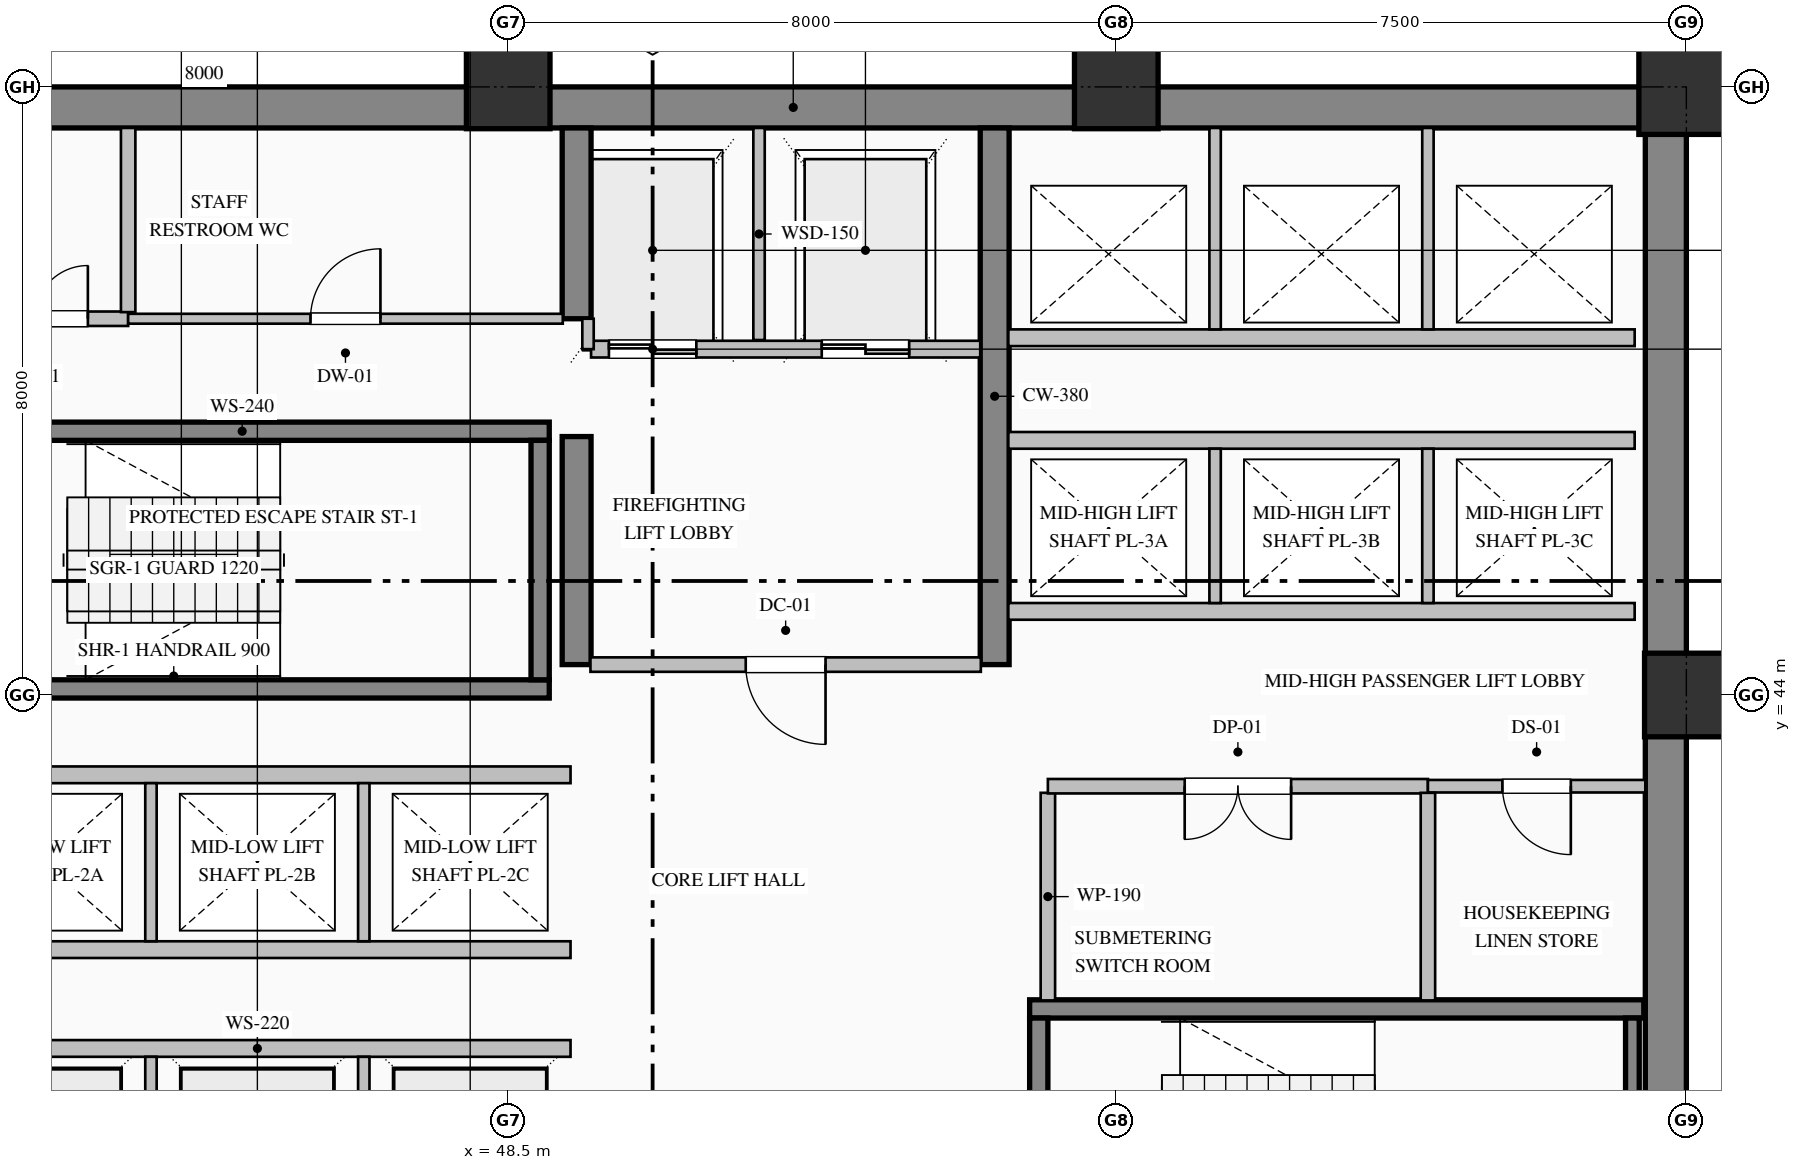
"""IFC4 building model, lengths in metres.
Left out: names, types, materials, properties, quantities, classifications, styles, units other than length and angle.
Written with IfcOpenShell. Run it as: python <this file> out.ifc"""

import sys

from ifc_helpers import new_model, si_unit, direction, frame, frame_2d, origin, origin_2d, place, context, subcontext, project, spatial, rectangle, hollow_rectangle, extrude, element, fill, save


model = new_model("IFC4")
c1 = context("Model", 3, precision=1e-05, world=origin(), true_north=direction((0.0, 1.0)))
c2 = subcontext(c1, "Body", "Model", "MODEL_VIEW")
j1 = project(units=[si_unit("LENGTHUNIT", "METRE"), si_unit("PLANEANGLEUNIT", "RADIAN")], contexts=[c1])
p1 = place(None, origin())
s1 = spatial("IfcSite", under=j1, at=p1, CompositionType="ELEMENT")
p2 = place(p1, origin())
s2 = spatial("IfcBuilding", under=s1, at=p2, CompositionType="ELEMENT")
p3 = place(p2, frame((0.0, 0.0, 96.2)))
s3 = spatial("IfcBuildingStorey", under=s2, at=p3, CompositionType="ELEMENT", Elevation=96.2)
p4 = place(p3, frame((40.5, 51.73, 0.0), z_axis=(0.0, 0.0, 1.0), x_axis=(1.0, 0.0, 0.0)))
e1 = element("IfcWall", 1, at=p4, inside=s3, PredefinedType="SHEAR", context=c2, shape_type="SweptSolid", body=[
    extrude(rectangle(XDim=23.5, YDim=0.54, at=frame_2d((11.75, 0.0))), origin(), (0.0, 0.0, 1.0), 3.75),
])
p5 = place(p3, frame((63.73, 36.32, 0.0), z_axis=(0.0, 0.0, 1.0), x_axis=(0.0, 1.0, 0.0)))
e2 = element("IfcWall", 2, at=p5, inside=s3, PredefinedType="SHEAR", context=c2, shape_type="SweptSolid", body=[
    extrude(rectangle(XDim=15.14, YDim=0.54, at=frame_2d((7.57, 0.0))), origin(), (0.0, 0.0, 1.0), 3.75),
])
p6 = place(p3, frame((49.4, 44.4, 0.0), z_axis=(0.0, 0.0, 1.0), x_axis=(0.0, 1.0, 0.0)))
e3 = element("IfcWall", 3, at=p6, inside=s3, PredefinedType="SHEAR", context=c2, shape_type="SweptSolid", body=[
    extrude(rectangle(XDim=3.0, YDim=0.38, at=frame_2d((1.5, 0.0))), origin(), (0.0, 0.0, 1.0), 3.75),
])
p7 = place(p3, frame((49.4, 48.95, 0.0), z_axis=(0.0, 0.0, 1.0), x_axis=(0.0, 1.0, 0.0)))
e4 = element("IfcWall", 4, at=p7, inside=s3, PredefinedType="SHEAR", context=c2, shape_type="SweptSolid", body=[
    extrude(rectangle(XDim=2.51, YDim=0.38, at=frame_2d((1.255, 0.0))), origin(), (0.0, 0.0, 1.0), 3.75),
])
p8 = place(p3, frame((54.9, 44.4, 0.0), z_axis=(0.0, 0.0, 1.0), x_axis=(0.0, 1.0, 0.0)))
e5 = element("IfcWall", 5, at=p8, inside=s3, PredefinedType="SHEAR", context=c2, shape_type="SweptSolid", body=[
    extrude(rectangle(XDim=7.06, YDim=0.38, at=frame_2d((3.53, 0.0))), origin(), (0.0, 0.0, 1.0), 3.75),
])
for number, where, z_axis, x_axis in (
    (6, (48.5, 52.0, 0.0), (0.0, 0.0, 1.0), (1.0, 0.0, 0.0)),
    (7, (56.5, 52.0, 0.0), (0.0, 0.0, 1.0), (1.0, 0.0, 0.0)),
    (8, (64.0, 44.0, 0.0), (0.0, 0.0, 1.0), (1.0, 0.0, 0.0)),
):
    element("IfcColumn", number, at=place(p3, frame(where, z_axis=z_axis, x_axis=x_axis)), inside=s3, PredefinedType="COLUMN", context=c2, shape_type="SweptSolid", body=[
        extrude(hollow_rectangle(XDim=1.1, YDim=1.1, WallThickness=0.04, at=origin_2d()), origin(), (0.0, 0.0, 1.0), 4.0),
    ])
p9 = place(p3, frame((64.0, 52.0, 0.0), z_axis=(0.0, 0.0, 1.0), x_axis=(1.0, 0.0, 0.0)))
e9 = element("IfcColumn", 9, at=p9, inside=s3, PredefinedType="COLUMN", context=c2, shape_type="SweptSolid", body=[
    extrude(hollow_rectangle(XDim=1.25, YDim=1.25, WallThickness=0.045, at=origin_2d()), origin(), (0.0, 0.0, 1.0), 4.0),
])
for number, where, z_axis, x_axis in (
    (10, (40.96, 47.47, 0.0), (0.0, 0.0, 1.0), (1.0, 0.0, 0.0)),
    (11, (49.04, 44.08, 0.0), (0.0, 0.0, 1.0), (-1.0, 0.0, 0.0)),
):
    element("IfcWall", number, at=place(p3, frame(where, z_axis=z_axis, x_axis=x_axis)), inside=s3, PredefinedType="SOLIDWALL", context=c2, shape_type="SweptSolid", body=[
        extrude(rectangle(XDim=8.08, YDim=0.24, at=frame_2d((4.04, 0.0))), origin(), (0.0, 0.0, 1.0), 4.0),
    ])
p10 = place(p3, frame((48.92, 44.2, 0.0), z_axis=(0.0, 0.0, 1.0), x_axis=(0.0, 1.0, 0.0)))
e12 = element("IfcWall", 12, at=p10, inside=s3, PredefinedType="SOLIDWALL", context=c2, shape_type="SweptSolid", body=[
    extrude(rectangle(XDim=3.15, YDim=0.24, at=frame_2d((1.575, 0.0))), origin(), (0.0, 0.0, 1.0), 4.0),
])
p11 = place(p3, frame((55.36, 39.87, 0.0), z_axis=(0.0, 0.0, 1.0), x_axis=(1.0, 0.0, 0.0)))
e13 = element("IfcWall", 13, at=p11, inside=s3, PredefinedType="SOLIDWALL", context=c2, shape_type="SweptSolid", body=[
    extrude(rectangle(XDim=8.08, YDim=0.24, at=frame_2d((4.04, 0.0))), origin(), (0.0, 0.0, 1.0), 4.0),
])
p12 = place(p3, frame((55.48, 39.75, 0.0), z_axis=(0.0, 0.0, 1.0), x_axis=(0.0, -1.0, 0.0)))
e14 = element("IfcWall", 14, at=p12, inside=s3, PredefinedType="SOLIDWALL", context=c2, shape_type="SweptSolid", body=[
    extrude(rectangle(XDim=3.15, YDim=0.24, at=frame_2d((1.575, 0.0))), origin(), (0.0, 0.0, 1.0), 4.0),
])
p13 = place(p12, frame((1.0, 0.0, 0.0)))
e15 = element("IfcOpeningElement", 15, at=p13, cuts=e14, PredefinedType="OPENING", context=c2, shape_type="SweptSolid", body=[
    extrude(rectangle(XDim=1.15, YDim=2.2, at=frame_2d((0.575, 1.1))), frame((0.0, 0.13, 0.0), z_axis=(0.0, -1.0, 0.0), x_axis=(1.0, 0.0, 0.0)), (0.0, 0.0, 1.0), 0.26),
])
p14 = place(p3, frame((63.29, 36.6, 0.0), z_axis=(0.0, 0.0, 1.0), x_axis=(0.0, 1.0, 0.0)))
e16 = element("IfcWall", 16, at=p14, inside=s3, PredefinedType="SOLIDWALL", context=c2, shape_type="SweptSolid", body=[
    extrude(rectangle(XDim=3.15, YDim=0.18, at=frame_2d((1.575, 0.0))), origin(), (0.0, 0.0, 1.0), 4.0),
])
p15 = place(p3, frame((54.71, 48.55, 0.0), z_axis=(0.0, 0.0, 1.0), x_axis=(-1.0, 0.0, 0.0)))
e17 = element("IfcWall", 17, at=p15, inside=s3, PredefinedType="PARTITIONING", context=c2, shape_type="SweptSolid", body=[
    extrude(rectangle(XDim=5.12, YDim=0.22, at=frame_2d((2.56, 0.0))), origin(), (0.0, 0.0, 1.0), 3.75),
])
p16 = place(p15, frame((3.735, 0.0, 0.0)))
e18 = element("IfcOpeningElement", 18, at=p16, cuts=e17, PredefinedType="OPENING", context=c2, shape_type="SweptSolid", body=[
    extrude(rectangle(XDim=1.15, YDim=2.2, at=frame_2d((0.575, 1.1))), frame((0.0, 0.12, 0.0), z_axis=(0.0, -1.0, 0.0), x_axis=(1.0, 0.0, 0.0)), (0.0, 0.0, 1.0), 0.24),
])
p17 = place(p15, frame((0.935, 0.0, 0.0)))
e19 = element("IfcOpeningElement", 19, at=p17, cuts=e17, PredefinedType="OPENING", context=c2, shape_type="SweptSolid", body=[
    extrude(rectangle(XDim=1.15, YDim=2.2, at=frame_2d((0.575, 1.1))), frame((0.0, 0.12, 0.0), z_axis=(0.0, -1.0, 0.0), x_axis=(1.0, 0.0, 0.0)), (0.0, 0.0, 1.0), 0.24),
])
p18 = place(p3, frame((51.8, 48.67, 0.0), z_axis=(0.0, 0.0, 1.0), x_axis=(0.0, 1.0, 0.0)))
e20 = element("IfcWall", 20, at=p18, inside=s3, PredefinedType="PARTITIONING", context=c2, shape_type="SweptSolid", body=[
    extrude(rectangle(XDim=2.79, YDim=0.15, at=frame_2d((1.395, 0.0))), origin(), (0.0, 0.0, 1.0), 3.75),
])
p19 = place(p3, frame((49.55, 48.55, 0.0), z_axis=(0.0, 0.0, 1.0), x_axis=(0.0, 1.0, 0.0)))
e21 = element("IfcWall", 21, at=p19, inside=s3, PredefinedType="PARTITIONING", context=c2, shape_type="SweptSolid", body=[
    extrude(rectangle(XDim=0.4, YDim=0.15, at=frame_2d((0.2, 0.0))), origin(), (0.0, 0.0, 1.0), 3.75),
])
p20 = place(p3, frame((41.08, 39.35, 0.0), z_axis=(0.0, 0.0, 1.0), x_axis=(1.0, 0.0, 0.0)))
e22 = element("IfcWall", 22, at=p20, inside=s3, PredefinedType="PARTITIONING", context=c2, shape_type="SweptSolid", body=[
    extrude(rectangle(XDim=8.24, YDim=0.22, at=frame_2d((4.12, 0.0))), origin(), (0.0, 0.0, 1.0), 3.75),
])
for number, where, z_axis, x_axis in (
    (23, (43.8, 37.16, 0.0), (0.0, 0.0, 1.0), (0.0, 1.0, 0.0)),
    (24, (46.6, 37.16, 0.0), (0.0, 0.0, 1.0), (0.0, 1.0, 0.0)),
):
    element("IfcWall", number, at=place(p3, frame(where, z_axis=z_axis, x_axis=x_axis)), inside=s3, PredefinedType="PARTITIONING", context=c2, shape_type="SweptSolid", body=[
        extrude(rectangle(XDim=2.08, YDim=0.15, at=frame_2d((1.04, 0.0))), origin(), (0.0, 0.0, 1.0), 3.75),
    ])
for number, where, z_axis, x_axis in (
    (25, (49.32, 40.65, 0.0), (0.0, 0.0, 1.0), (-1.0, 0.0, 0.0)),
    (26, (41.08, 42.95, 0.0), (0.0, 0.0, 1.0), (1.0, 0.0, 0.0)),
):
    element("IfcWall", number, at=place(p3, frame(where, z_axis=z_axis, x_axis=x_axis)), inside=s3, PredefinedType="PARTITIONING", context=c2, shape_type="SweptSolid", body=[
        extrude(rectangle(XDim=8.24, YDim=0.22, at=frame_2d((4.12, 0.0))), origin(), (0.0, 0.0, 1.0), 3.75),
    ])
for number, where, z_axis, x_axis in (
    (27, (43.8, 40.76, 0.0), (0.0, 0.0, 1.0), (0.0, 1.0, 0.0)),
    (28, (46.6, 40.76, 0.0), (0.0, 0.0, 1.0), (0.0, 1.0, 0.0)),
):
    element("IfcWall", number, at=place(p3, frame(where, z_axis=z_axis, x_axis=x_axis)), inside=s3, PredefinedType="PARTITIONING", context=c2, shape_type="SweptSolid", body=[
        extrude(rectangle(XDim=2.08, YDim=0.15, at=frame_2d((1.04, 0.0))), origin(), (0.0, 0.0, 1.0), 3.75),
    ])
for number, where, z_axis, x_axis in (
    (29, (63.32, 45.1, 0.0), (0.0, 0.0, 1.0), (-1.0, 0.0, 0.0)),
    (30, (55.08, 47.35, 0.0), (0.0, 0.0, 1.0), (1.0, 0.0, 0.0)),
):
    element("IfcWall", number, at=place(p3, frame(where, z_axis=z_axis, x_axis=x_axis)), inside=s3, PredefinedType="PARTITIONING", context=c2, shape_type="SweptSolid", body=[
        extrude(rectangle(XDim=8.24, YDim=0.22, at=frame_2d((4.12, 0.0))), origin(), (0.0, 0.0, 1.0), 3.75),
    ])
for number, where, z_axis, x_axis in (
    (31, (57.8, 45.21, 0.0), (0.0, 0.0, 1.0), (0.0, 1.0, 0.0)),
    (32, (60.6, 45.21, 0.0), (0.0, 0.0, 1.0), (0.0, 1.0, 0.0)),
):
    element("IfcWall", number, at=place(p3, frame(where, z_axis=z_axis, x_axis=x_axis)), inside=s3, PredefinedType="PARTITIONING", context=c2, shape_type="SweptSolid", body=[
        extrude(rectangle(XDim=2.03, YDim=0.15, at=frame_2d((1.015, 0.0))), origin(), (0.0, 0.0, 1.0), 3.75),
    ])
p21 = place(p3, frame((63.32, 48.7, 0.0), z_axis=(0.0, 0.0, 1.0), x_axis=(-1.0, 0.0, 0.0)))
e33 = element("IfcWall", 33, at=p21, inside=s3, PredefinedType="PARTITIONING", context=c2, shape_type="SweptSolid", body=[
    extrude(rectangle(XDim=8.24, YDim=0.22, at=frame_2d((4.12, 0.0))), origin(), (0.0, 0.0, 1.0), 3.75),
])
for number, where, z_axis, x_axis in (
    (34, (57.8, 48.81, 0.0), (0.0, 0.0, 1.0), (0.0, 1.0, 0.0)),
    (35, (60.6, 48.81, 0.0), (0.0, 0.0, 1.0), (0.0, 1.0, 0.0)),
):
    element("IfcWall", number, at=place(p3, frame(where, z_axis=z_axis, x_axis=x_axis)), inside=s3, PredefinedType="PARTITIONING", context=c2, shape_type="SweptSolid", body=[
        extrude(rectangle(XDim=2.65, YDim=0.15, at=frame_2d((1.325, 0.0))), origin(), (0.0, 0.0, 1.0), 3.75),
    ])
p22 = place(p3, frame((41.04, 48.95, 0.0), z_axis=(0.0, 0.0, 1.0), x_axis=(1.0, 0.0, 0.0)))
e36 = element("IfcWall", 36, at=p22, inside=s3, PredefinedType="PARTITIONING", context=c2, shape_type="SweptSolid", body=[
    extrude(rectangle(XDim=2.46, YDim=0.19, at=frame_2d((1.23, 0.0))), origin(), (0.0, 0.0, 1.0), 3.75),
])
p23 = place(p22, frame((0.53, 0.0, 0.0)))
e37 = element("IfcOpeningElement", 37, at=p23, cuts=e36, PredefinedType="OPENING", context=c2, shape_type="SweptSolid", body=[
    extrude(rectangle(XDim=1.4, YDim=2.25, at=frame_2d((0.7, 1.125))), frame((0.0, 0.105, 0.0), z_axis=(0.0, -1.0, 0.0), x_axis=(1.0, 0.0, 0.0)), (0.0, 0.0, 1.0), 0.21),
])
p24 = place(p3, frame((43.5, 48.95, 0.0), z_axis=(0.0, 0.0, 1.0), x_axis=(1.0, 0.0, 0.0)))
e38 = element("IfcWall", 38, at=p24, inside=s3, PredefinedType="PARTITIONING", context=c2, shape_type="SweptSolid", body=[
    extrude(rectangle(XDim=5.718, YDim=0.13, at=frame_2d((2.859, 0.0))), origin(), (0.0, 0.0, 1.0), 3.75),
])
p25 = place(p24, frame((2.399, 0.0, 0.0)))
e39 = element("IfcOpeningElement", 39, at=p25, cuts=e38, PredefinedType="OPENING", context=c2, shape_type="SweptSolid", body=[
    extrude(rectangle(XDim=0.92, YDim=2.15, at=frame_2d((0.46, 1.075))), frame((0.0, 0.075, 0.0), z_axis=(0.0, -1.0, 0.0), x_axis=(1.0, 0.0, 0.0)), (0.0, 0.0, 1.0), 0.15),
])
p26 = place(p3, frame((54.718, 44.4, 0.0), z_axis=(0.0, 0.0, 1.0), x_axis=(-1.0, 0.0, 0.0)))
e40 = element("IfcWall", 40, at=p26, inside=s3, PredefinedType="PARTITIONING", context=c2, shape_type="SweptSolid", body=[
    extrude(rectangle(XDim=5.136, YDim=0.19, at=frame_2d((2.568, 0.0))), origin(), (0.0, 0.0, 1.0), 3.75),
])
p27 = place(p26, frame((2.043, 0.0, 0.0)))
e41 = element("IfcOpeningElement", 41, at=p27, cuts=e40, PredefinedType="OPENING", context=c2, shape_type="SweptSolid", body=[
    extrude(rectangle(XDim=1.05, YDim=2.15, at=frame_2d((0.525, 1.075))), frame((0.0, 0.105, 0.0), z_axis=(0.0, -1.0, 0.0), x_axis=(1.0, 0.0, 0.0)), (0.0, 0.0, 1.0), 0.21),
])
p28 = place(p3, frame((55.6, 42.713, 0.0), z_axis=(0.0, 0.0, 1.0), x_axis=(0.0, -1.0, 0.0)))
e42 = element("IfcWall", 42, at=p28, inside=s3, PredefinedType="PARTITIONING", context=c2, shape_type="SweptSolid", body=[
    extrude(rectangle(XDim=2.731, YDim=0.19, at=frame_2d((1.365, 0.0))), origin(), (0.0, 0.0, 1.0), 3.75),
])
p29 = place(p3, frame((60.6, 42.8, 0.0), z_axis=(0.0, 0.0, 1.0), x_axis=(-1.0, 0.0, 0.0)))
e43 = element("IfcWall", 43, at=p29, inside=s3, PredefinedType="PARTITIONING", context=c2, shape_type="SweptSolid", body=[
    extrude(rectangle(XDim=5.0, YDim=0.19, at=frame_2d((2.5, 0.0))), origin(), (0.0, 0.0, 1.0), 3.75),
])
p30 = place(p29, frame((1.8, 0.0, 0.0)))
e44 = element("IfcOpeningElement", 44, at=p30, cuts=e43, PredefinedType="OPENING", context=c2, shape_type="SweptSolid", body=[
    extrude(rectangle(XDim=1.4, YDim=2.25, at=frame_2d((0.7, 1.125))), frame((0.0, 0.105, 0.0), z_axis=(0.0, -1.0, 0.0), x_axis=(1.0, 0.0, 0.0)), (0.0, 0.0, 1.0), 0.21),
])
p31 = place(p3, frame((63.46, 42.8, 0.0), z_axis=(0.0, 0.0, 1.0), x_axis=(-1.0, 0.0, 0.0)))
e45 = element("IfcWall", 45, at=p31, inside=s3, PredefinedType="PARTITIONING", context=c2, shape_type="SweptSolid", body=[
    extrude(rectangle(XDim=2.86, YDim=0.165, at=frame_2d((1.43, 0.0))), origin(), (0.0, 0.0, 1.0), 3.75),
])
p32 = place(p31, frame((0.98, 0.0, 0.0)))
e46 = element("IfcOpeningElement", 46, at=p32, cuts=e45, PredefinedType="OPENING", context=c2, shape_type="SweptSolid", body=[
    extrude(rectangle(XDim=0.9, YDim=2.15, at=frame_2d((0.45, 1.075))), frame((0.0, 0.093, 0.0), z_axis=(0.0, -1.0, 0.0), x_axis=(1.0, 0.0, 0.0)), (0.0, 0.0, 1.0), 0.185),
])
p33 = place(p3, frame((43.5, 51.46, 0.0), z_axis=(0.0, 0.0, 1.0), x_axis=(0.0, -1.0, 0.0)))
e47 = element("IfcWall", 47, at=p33, inside=s3, PredefinedType="PARTITIONING", context=c2, shape_type="SweptSolid", body=[
    extrude(rectangle(XDim=2.423, YDim=0.19, at=frame_2d((1.211, 0.0))), origin(), (0.0, 0.0, 1.0), 3.75),
])
p34 = place(p3, frame((60.6, 42.713, 0.0), z_axis=(0.0, 0.0, 1.0), x_axis=(0.0, -1.0, 0.0)))
e48 = element("IfcWall", 48, at=p34, inside=s3, PredefinedType="PARTITIONING", context=c2, shape_type="SweptSolid", body=[
    extrude(rectangle(XDim=2.731, YDim=0.19, at=frame_2d((1.365, 0.0))), origin(), (0.0, 0.0, 1.0), 3.75),
])
p35 = place(p16, origin())
e49 = element("IfcDoor", 49, at=p35, inside=s3, OperationType="DOUBLE_DOOR_SLIDING", PredefinedType="DOOR", context=c2, shape_type="SweptSolid", body=[
    extrude(rectangle(XDim=1.15, YDim=2.2, at=frame_2d((0.575, 1.1))), frame((0.0, 0.025, 0.0), z_axis=(0.0, -1.0, 0.0), x_axis=(1.0, 0.0, 0.0)), (0.0, 0.0, 1.0), 0.05),
])
fill(e18, e49)
p36 = place(p17, origin())
e50 = element("IfcDoor", 50, at=p36, inside=s3, OperationType="DOUBLE_DOOR_SLIDING", PredefinedType="DOOR", context=c2, shape_type="SweptSolid", body=[
    extrude(rectangle(XDim=1.15, YDim=2.2, at=frame_2d((0.575, 1.1))), frame((0.0, 0.025, 0.0), z_axis=(0.0, -1.0, 0.0), x_axis=(1.0, 0.0, 0.0)), (0.0, 0.0, 1.0), 0.05),
])
fill(e19, e50)
p37 = place(p27, origin())
e51 = element("IfcDoor", 51, at=p37, inside=s3, OperationType="SINGLE_SWING_LEFT", PredefinedType="DOOR", context=c2, shape_type="SweptSolid", body=[
    extrude(rectangle(XDim=1.05, YDim=2.15, at=frame_2d((0.525, 1.075))), frame((0.0, 0.025, 0.0), z_axis=(0.0, -1.0, 0.0), x_axis=(1.0, 0.0, 0.0)), (0.0, 0.0, 1.0), 0.05),
])
fill(e41, e51)
p38 = place(p23, origin())
e52 = element("IfcDoor", 52, at=p38, inside=s3, OperationType="DOUBLE_DOOR_SINGLE_SWING", PredefinedType="DOOR", context=c2, shape_type="SweptSolid", body=[
    extrude(rectangle(XDim=1.4, YDim=2.25, at=frame_2d((0.7, 1.125))), frame((0.0, 0.025, 0.0), z_axis=(0.0, -1.0, 0.0), x_axis=(1.0, 0.0, 0.0)), (0.0, 0.0, 1.0), 0.05),
])
fill(e37, e52)
p39 = place(p25, origin())
e53 = element("IfcDoor", 53, at=p39, inside=s3, OperationType="SINGLE_SWING_RIGHT", PredefinedType="DOOR", context=c2, shape_type="SweptSolid", body=[
    extrude(rectangle(XDim=0.92, YDim=2.15, at=frame_2d((0.46, 1.075))), frame((0.0, 0.025, 0.0), z_axis=(0.0, -1.0, 0.0), x_axis=(1.0, 0.0, 0.0)), (0.0, 0.0, 1.0), 0.05),
])
fill(e39, e53)
p40 = place(p30, origin())
e54 = element("IfcDoor", 54, at=p40, inside=s3, OperationType="DOUBLE_DOOR_SINGLE_SWING", PredefinedType="DOOR", context=c2, shape_type="SweptSolid", body=[
    extrude(rectangle(XDim=1.4, YDim=2.25, at=frame_2d((0.7, 1.125))), frame((0.0, 0.025, 0.0), z_axis=(0.0, -1.0, 0.0), x_axis=(1.0, 0.0, 0.0)), (0.0, 0.0, 1.0), 0.05),
])
fill(e44, e54)
p41 = place(p32, origin())
e55 = element("IfcDoor", 55, at=p41, inside=s3, OperationType="SINGLE_SWING_LEFT", PredefinedType="DOOR", context=c2, shape_type="SweptSolid", body=[
    extrude(rectangle(XDim=0.9, YDim=2.15, at=frame_2d((0.45, 1.075))), frame((0.0, 0.025, 0.0), z_axis=(0.0, -1.0, 0.0), x_axis=(1.0, 0.0, 0.0)), (0.0, 0.0, 1.0), 0.05),
])
fill(e46, e55)
save(model, sys.argv[1])
